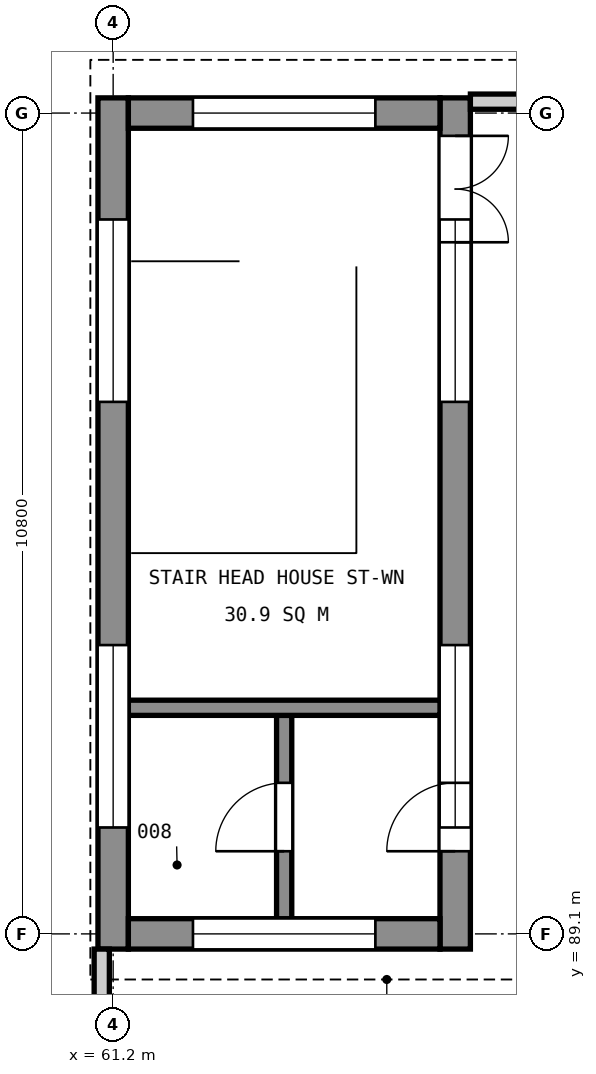
"""IFC4 building model, lengths in metres.
Left out: names, types, materials, properties, quantities, classifications, styles, units other than length and angle.
Written with IfcOpenShell. Run it as: python <this file> out.ifc"""

import sys

from ifc_helpers import new_model, si_unit, direction, frame, frame_2d, origin, place, context, subcontext, project, spatial, rectangle, extrude, element, fill, save


model = new_model("IFC4")
c1 = context("Model", 3, precision=1e-05, world=origin(), true_north=direction((0.0, 1.0)))
c2 = subcontext(c1, "Body", "Model", "MODEL_VIEW")
j1 = project(units=[si_unit("LENGTHUNIT", "METRE"), si_unit("PLANEANGLEUNIT", "RADIAN")], contexts=[c1])
p1 = place(None, origin())
s1 = spatial("IfcSite", under=j1, at=p1, CompositionType="ELEMENT")
p2 = place(p1, origin())
s2 = spatial("IfcBuilding", under=s1, at=p2, CompositionType="ELEMENT")
p3 = place(p2, frame((0.0, 0.0, 75.0)))
s3 = spatial("IfcBuildingStorey", under=s2, at=p3, CompositionType="ELEMENT", Elevation=75.0)
p4 = place(p3, frame((61.2, 88.9, 0.0), z_axis=(0.0, 0.0, 1.0), x_axis=(0.0, 1.0, 0.0)))
e1 = element("IfcWall", 1, at=p4, inside=s3, PredefinedType="SHEAR", context=c2, shape_type="SweptSolid", body=[
    extrude(rectangle(XDim=11.2, YDim=0.4, at=frame_2d((5.6, 0.0))), origin(), (0.0, 0.0, 1.0), 3.6),
])
p5 = place(p4, frame((1.6, 0.0, 2.2)))
e2 = element("IfcOpeningElement", 2, at=p5, cuts=e1, PredefinedType="OPENING", context=c2, shape_type="SweptSolid", body=[
    extrude(rectangle(XDim=2.4, YDim=1.2, at=frame_2d((1.2, 0.6))), frame((0.0, 0.21, 0.0), z_axis=(0.0, -1.0, 0.0), x_axis=(1.0, 0.0, 0.0)), (0.0, 0.0, 1.0), 0.42),
])
p6 = place(p4, frame((7.2, 0.0, 2.2)))
e3 = element("IfcOpeningElement", 3, at=p6, cuts=e1, PredefinedType="OPENING", context=c2, shape_type="SweptSolid", body=[
    extrude(rectangle(XDim=2.4, YDim=1.2, at=frame_2d((1.2, 0.6))), frame((0.0, 0.21, 0.0), z_axis=(0.0, -1.0, 0.0), x_axis=(1.0, 0.0, 0.0)), (0.0, 0.0, 1.0), 0.42),
])
p7 = place(p3, frame((65.7, 88.9, 0.0), z_axis=(0.0, 0.0, 1.0), x_axis=(0.0, 1.0, 0.0)))
e4 = element("IfcWall", 4, at=p7, inside=s3, PredefinedType="SHEAR", context=c2, shape_type="SweptSolid", body=[
    extrude(rectangle(XDim=11.2, YDim=0.4, at=frame_2d((5.6, 0.0))), origin(), (0.0, 0.0, 1.0), 3.6),
])
p8 = place(p7, frame((9.3, 0.0, 0.0)))
e5 = element("IfcOpeningElement", 5, at=p8, cuts=e4, PredefinedType="OPENING", context=c2, shape_type="SweptSolid", body=[
    extrude(rectangle(XDim=1.4, YDim=2.1, at=frame_2d((0.7, 1.05))), frame((0.0, 0.21, 0.0), z_axis=(0.0, -1.0, 0.0), x_axis=(1.0, 0.0, 0.0)), (0.0, 0.0, 1.0), 0.42),
])
p9 = place(p7, frame((1.6, 0.0, 2.2)))
e6 = element("IfcOpeningElement", 6, at=p9, cuts=e4, PredefinedType="OPENING", context=c2, shape_type="SweptSolid", body=[
    extrude(rectangle(XDim=2.4, YDim=1.2, at=frame_2d((1.2, 0.6))), frame((0.0, 0.21, 0.0), z_axis=(0.0, -1.0, 0.0), x_axis=(1.0, 0.0, 0.0)), (0.0, 0.0, 1.0), 0.42),
])
p10 = place(p7, frame((7.2, 0.0, 2.2)))
e7 = element("IfcOpeningElement", 7, at=p10, cuts=e4, PredefinedType="OPENING", context=c2, shape_type="SweptSolid", body=[
    extrude(rectangle(XDim=2.4, YDim=1.2, at=frame_2d((1.2, 0.6))), frame((0.0, 0.21, 0.0), z_axis=(0.0, -1.0, 0.0), x_axis=(1.0, 0.0, 0.0)), (0.0, 0.0, 1.0), 0.42),
])
p11 = place(p7, frame((1.288, 0.0, 0.0)))
e8 = element("IfcOpeningElement", 8, at=p11, cuts=e4, PredefinedType="OPENING", context=c2, shape_type="SweptSolid", body=[
    extrude(rectangle(XDim=0.9, YDim=2.1, at=frame_2d((0.45, 1.05))), frame((0.0, 0.21, 0.0), z_axis=(0.0, -1.0, 0.0), x_axis=(1.0, 0.0, 0.0)), (0.0, 0.0, 1.0), 0.42),
])
p12 = place(p3, frame((61.4, 89.1, 0.0), z_axis=(0.0, 0.0, 1.0), x_axis=(1.0, 0.0, 0.0)))
e9 = element("IfcWall", 9, at=p12, inside=s3, PredefinedType="SHEAR", context=c2, shape_type="SweptSolid", body=[
    extrude(rectangle(XDim=4.1, YDim=0.4, at=frame_2d((2.05, 0.0))), origin(), (0.0, 0.0, 1.0), 3.6),
])
p13 = place(p12, frame((0.85, 0.0, 2.2)))
e10 = element("IfcOpeningElement", 10, at=p13, cuts=e9, PredefinedType="OPENING", context=c2, shape_type="SweptSolid", body=[
    extrude(rectangle(XDim=2.4, YDim=1.2, at=frame_2d((1.2, 0.6))), frame((0.0, 0.21, 0.0), z_axis=(0.0, -1.0, 0.0), x_axis=(1.0, 0.0, 0.0)), (0.0, 0.0, 1.0), 0.42),
])
p14 = place(p3, frame((61.4, 99.9, 0.0), z_axis=(0.0, 0.0, 1.0), x_axis=(1.0, 0.0, 0.0)))
e11 = element("IfcWall", 11, at=p14, inside=s3, PredefinedType="SHEAR", context=c2, shape_type="SweptSolid", body=[
    extrude(rectangle(XDim=4.1, YDim=0.4, at=frame_2d((2.05, 0.0))), origin(), (0.0, 0.0, 1.0), 3.6),
])
p15 = place(p14, frame((0.85, 0.0, 2.2)))
e12 = element("IfcOpeningElement", 12, at=p15, cuts=e11, PredefinedType="OPENING", context=c2, shape_type="SweptSolid", body=[
    extrude(rectangle(XDim=2.4, YDim=1.2, at=frame_2d((1.2, 0.6))), frame((0.0, 0.21, 0.0), z_axis=(0.0, -1.0, 0.0), x_axis=(1.0, 0.0, 0.0)), (0.0, 0.0, 1.0), 0.42),
])
p16 = place(p3, frame((61.05, 74.9, 0.0), z_axis=(0.0, 0.0, 1.0), x_axis=(0.0, 1.0, 0.0)))
e13 = element("IfcWall", 13, at=p16, inside=s3, PredefinedType="PARAPET", context=c2, shape_type="SweptSolid", body=[
    extrude(rectangle(XDim=14.0, YDim=0.2, at=frame_2d((7.0, 0.0))), origin(), (0.0, 0.0, 1.0), 1.2),
])
p17 = place(p3, frame((65.9, 100.05, 0.0), z_axis=(0.0, 0.0, 1.0), x_axis=(1.0, 0.0, 0.0)))
e14 = element("IfcWall", 14, at=p17, inside=s3, PredefinedType="PARAPET", context=c2, shape_type="SweptSolid", body=[
    extrude(rectangle(XDim=2.5, YDim=0.2, at=frame_2d((1.25, 0.0))), origin(), (0.0, 0.0, 1.0), 1.2),
])
p18 = place(p3, frame((63.45, 89.3, 0.0), z_axis=(0.0, 0.0, 1.0), x_axis=(0.0, 1.0, 0.0)))
e15 = element("IfcWall", 15, at=p18, inside=s3, PredefinedType="SOLIDWALL", context=c2, shape_type="SweptSolid", body=[
    extrude(rectangle(XDim=2.675, YDim=0.2, at=frame_2d((1.337, 0.0))), origin(), (0.0, 0.0, 1.0), 3.6),
])
p19 = place(p18, frame((0.887, 0.0, 0.0)))
e16 = element("IfcOpeningElement", 16, at=p19, cuts=e15, PredefinedType="OPENING", context=c2, shape_type="SweptSolid", body=[
    extrude(rectangle(XDim=0.9, YDim=2.1, at=frame_2d((0.45, 1.05))), frame((0.0, 0.11, 0.0), z_axis=(0.0, -1.0, 0.0), x_axis=(1.0, 0.0, 0.0)), (0.0, 0.0, 1.0), 0.22),
])
p20 = place(p3, frame((61.4, 92.075, 0.0), z_axis=(0.0, 0.0, 1.0), x_axis=(1.0, 0.0, 0.0)))
e17 = element("IfcWall", 17, at=p20, inside=s3, PredefinedType="SOLIDWALL", context=c2, shape_type="SweptSolid", body=[
    extrude(rectangle(XDim=4.1, YDim=0.2, at=frame_2d((2.05, 0.0))), origin(), (0.0, 0.0, 1.0), 3.6),
])
p21 = place(p8, frame((1.4, 0.0, 0.0), z_axis=(0.0, 0.0, 1.0), x_axis=(-1.0, 0.0, 0.0)))
e18 = element("IfcDoor", 18, at=p21, inside=s3, OperationType="DOUBLE_DOOR_SINGLE_SWING", PredefinedType="DOOR", context=c2, shape_type="SweptSolid", body=[
    extrude(rectangle(XDim=1.4, YDim=2.1, at=frame_2d((0.7, 1.05))), frame((0.0, 0.025, 0.0), z_axis=(0.0, -1.0, 0.0), x_axis=(1.0, 0.0, 0.0)), (0.0, 0.0, 1.0), 0.05),
])
fill(e5, e18)
p22 = place(p5, origin())
e19 = element("IfcWindow", 19, at=p22, inside=s3, PartitioningType="SINGLE_PANEL", PredefinedType="USERDEFINED", context=c2, shape_type="SweptSolid", body=[
    extrude(rectangle(XDim=2.4, YDim=1.2, at=frame_2d((1.2, 0.6))), frame((0.0, 0.03, 0.0), z_axis=(0.0, -1.0, 0.0), x_axis=(1.0, 0.0, 0.0)), (0.0, 0.0, 1.0), 0.06),
])
fill(e2, e19)
p23 = place(p6, origin())
e20 = element("IfcWindow", 20, at=p23, inside=s3, PartitioningType="SINGLE_PANEL", PredefinedType="USERDEFINED", context=c2, shape_type="SweptSolid", body=[
    extrude(rectangle(XDim=2.4, YDim=1.2, at=frame_2d((1.2, 0.6))), frame((0.0, 0.03, 0.0), z_axis=(0.0, -1.0, 0.0), x_axis=(1.0, 0.0, 0.0)), (0.0, 0.0, 1.0), 0.06),
])
fill(e3, e20)
p24 = place(p9, origin())
e21 = element("IfcWindow", 21, at=p24, inside=s3, PartitioningType="SINGLE_PANEL", PredefinedType="USERDEFINED", context=c2, shape_type="SweptSolid", body=[
    extrude(rectangle(XDim=2.4, YDim=1.2, at=frame_2d((1.2, 0.6))), frame((0.0, 0.03, 0.0), z_axis=(0.0, -1.0, 0.0), x_axis=(1.0, 0.0, 0.0)), (0.0, 0.0, 1.0), 0.06),
])
fill(e6, e21)
p25 = place(p10, origin())
e22 = element("IfcWindow", 22, at=p25, inside=s3, PartitioningType="SINGLE_PANEL", PredefinedType="USERDEFINED", context=c2, shape_type="SweptSolid", body=[
    extrude(rectangle(XDim=2.4, YDim=1.2, at=frame_2d((1.2, 0.6))), frame((0.0, 0.03, 0.0), z_axis=(0.0, -1.0, 0.0), x_axis=(1.0, 0.0, 0.0)), (0.0, 0.0, 1.0), 0.06),
])
fill(e7, e22)
p26 = place(p13, origin())
e23 = element("IfcWindow", 23, at=p26, inside=s3, PartitioningType="SINGLE_PANEL", PredefinedType="USERDEFINED", context=c2, shape_type="SweptSolid", body=[
    extrude(rectangle(XDim=2.4, YDim=1.2, at=frame_2d((1.2, 0.6))), frame((0.0, 0.03, 0.0), z_axis=(0.0, -1.0, 0.0), x_axis=(1.0, 0.0, 0.0)), (0.0, 0.0, 1.0), 0.06),
])
fill(e10, e23)
p27 = place(p15, origin())
e24 = element("IfcWindow", 24, at=p27, inside=s3, PartitioningType="SINGLE_PANEL", PredefinedType="USERDEFINED", context=c2, shape_type="SweptSolid", body=[
    extrude(rectangle(XDim=2.4, YDim=1.2, at=frame_2d((1.2, 0.6))), frame((0.0, 0.03, 0.0), z_axis=(0.0, -1.0, 0.0), x_axis=(1.0, 0.0, 0.0)), (0.0, 0.0, 1.0), 0.06),
])
fill(e12, e24)
p28 = place(p11, origin())
e25 = element("IfcDoor", 25, at=p28, inside=s3, OperationType="SINGLE_SWING_LEFT", PredefinedType="DOOR", context=c2, shape_type="SweptSolid", body=[
    extrude(rectangle(XDim=0.9, YDim=2.1, at=frame_2d((0.45, 1.05))), frame((0.0, 0.025, 0.0), z_axis=(0.0, -1.0, 0.0), x_axis=(1.0, 0.0, 0.0)), (0.0, 0.0, 1.0), 0.05),
])
fill(e8, e25)
p29 = place(p19, origin())
e26 = element("IfcDoor", 26, at=p29, inside=s3, OperationType="SINGLE_SWING_LEFT", PredefinedType="DOOR", context=c2, shape_type="SweptSolid", body=[
    extrude(rectangle(XDim=0.9, YDim=2.1, at=frame_2d((0.45, 1.05))), frame((0.0, 0.025, 0.0), z_axis=(0.0, -1.0, 0.0), x_axis=(1.0, 0.0, 0.0)), (0.0, 0.0, 1.0), 0.05),
])
fill(e16, e26)
save(model, sys.argv[1])
